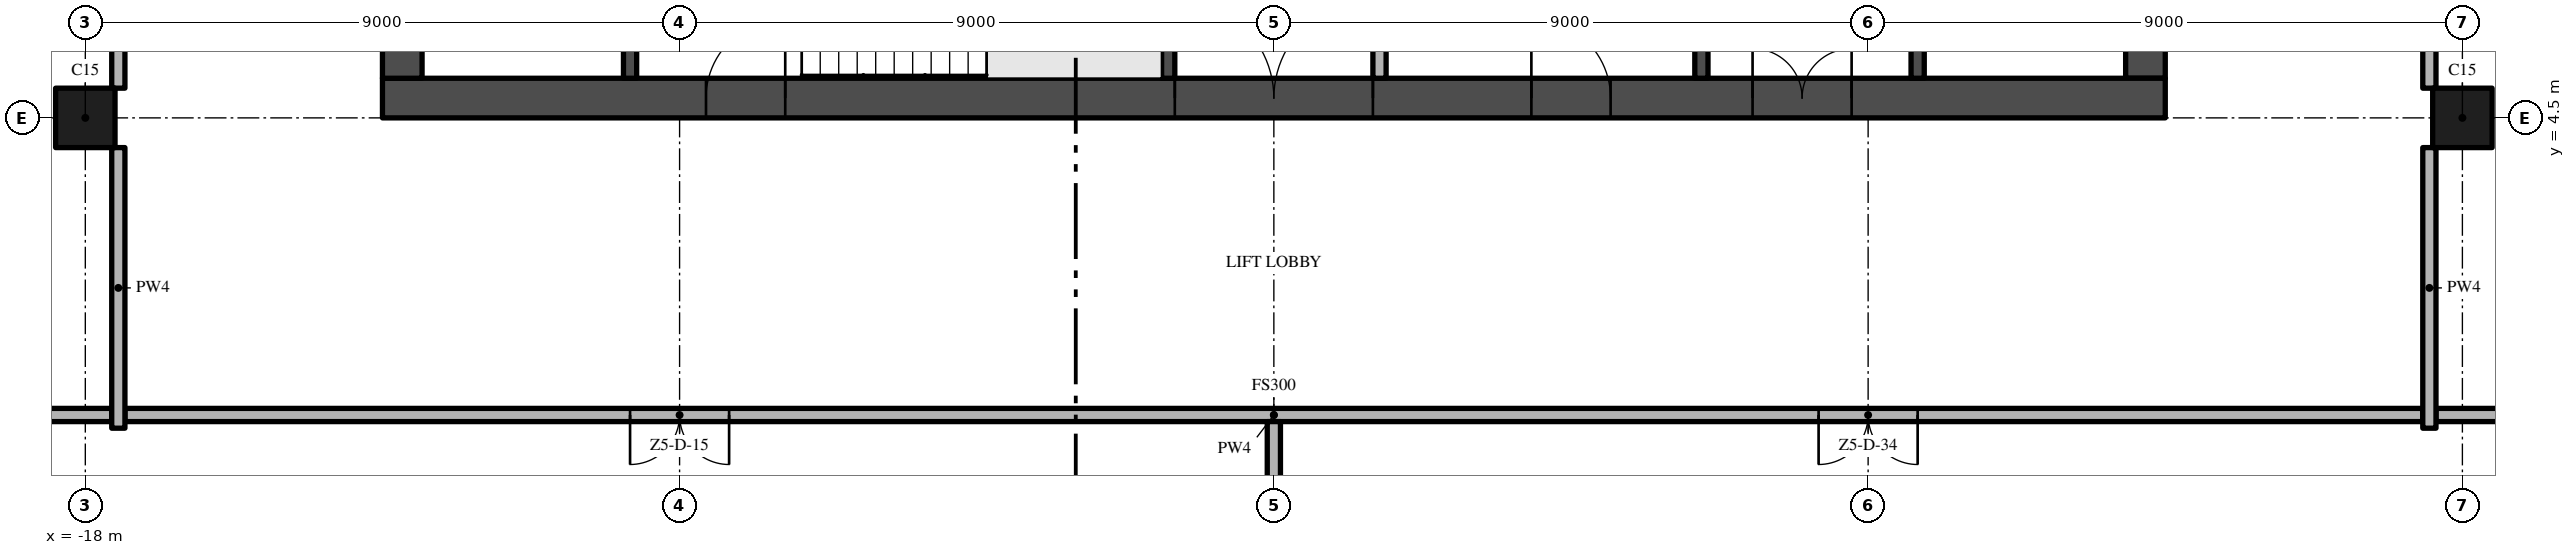
"""IFC4 building model, lengths in metres.
Left out: names, types, materials, properties, quantities, classifications, styles, units other than length and angle.
Written with IfcOpenShell. Run it as: python <this file> out.ifc"""

import sys

from ifc_helpers import new_model, si_unit, direction, frame, frame_2d, origin, origin_2d, place, context, subcontext, project, spatial, rectangle, extrude, element, fill, save


model = new_model("IFC4")
c1 = context("Model", 3, precision=1e-05, world=origin(), true_north=direction((0.0, 1.0)))
c2 = subcontext(c1, "Body", "Model", "MODEL_VIEW")
j1 = project(units=[si_unit("LENGTHUNIT", "METRE"), si_unit("PLANEANGLEUNIT", "RADIAN")], contexts=[c1])
p1 = place(None, origin())
s1 = spatial("IfcSite", under=j1, at=p1, CompositionType="ELEMENT")
p2 = place(p1, origin())
s2 = spatial("IfcBuilding", under=s1, at=p2, CompositionType="ELEMENT")
p3 = place(p2, frame((0.0, 0.0, 276.8)))
s3 = spatial("IfcBuildingStorey", under=s2, at=p3, CompositionType="ELEMENT", Elevation=276.8)
p4 = place(p3, frame((-13.5, 4.8, -0.3), z_axis=(0.0, 0.0, 1.0), x_axis=(1.0, 0.0, 0.0)))
e1 = element("IfcWall", 1, at=p4, inside=s3, PredefinedType="SHEAR", context=c2, shape_type="SweptSolid", body=[
    extrude(rectangle(XDim=27.0, YDim=0.6, at=frame_2d((13.5, 0.0))), origin(), (0.0, 0.0, 1.0), 3.8),
])
p5 = place(p4, frame((12.0, 0.0, 0.3)))
e2 = element("IfcOpeningElement", 2, at=p5, cuts=e1, PredefinedType="OPENING", context=c2, shape_type="SweptSolid", body=[
    extrude(rectangle(XDim=3.0, YDim=2.4, at=frame_2d((1.5, 1.2))), frame((0.0, 0.31, 0.0), z_axis=(0.0, -1.0, 0.0), x_axis=(1.0, 0.0, 0.0)), (0.0, 0.0, 1.0), 0.62),
])
p6 = place(p4, frame((4.9, 0.0, 0.3)))
e3 = element("IfcOpeningElement", 3, at=p6, cuts=e1, PredefinedType="OPENING", context=c2, shape_type="SweptSolid", body=[
    extrude(rectangle(XDim=1.2, YDim=2.2, at=frame_2d((0.6, 1.1))), frame((0.0, 0.31, 0.0), z_axis=(0.0, -1.0, 0.0), x_axis=(1.0, 0.0, 0.0)), (0.0, 0.0, 1.0), 0.62),
])
p7 = place(p4, frame((20.75, 0.0, 0.3)))
e4 = element("IfcOpeningElement", 4, at=p7, cuts=e1, PredefinedType="OPENING", context=c2, shape_type="SweptSolid", body=[
    extrude(rectangle(XDim=1.5, YDim=2.2, at=frame_2d((0.75, 1.1))), frame((0.0, 0.31, 0.0), z_axis=(0.0, -1.0, 0.0), x_axis=(1.0, 0.0, 0.0)), (0.0, 0.0, 1.0), 0.62),
])
p8 = place(p4, frame((17.4, 0.0, 0.3)))
e5 = element("IfcOpeningElement", 5, at=p8, cuts=e1, PredefinedType="OPENING", context=c2, shape_type="SweptSolid", body=[
    extrude(rectangle(XDim=1.2, YDim=2.2, at=frame_2d((0.6, 1.1))), frame((0.0, 0.31, 0.0), z_axis=(0.0, -1.0, 0.0), x_axis=(1.0, 0.0, 0.0)), (0.0, 0.0, 1.0), 0.62),
])
p9 = place(p3, frame((13.2, 5.1, -0.3), z_axis=(0.0, 0.0, 1.0), x_axis=(0.0, 1.0, 0.0)))
e6 = element("IfcWall", 6, at=p9, inside=s3, PredefinedType="SHEAR", context=c2, shape_type="SweptSolid", body=[
    extrude(rectangle(XDim=16.8, YDim=0.6, at=frame_2d((8.4, 0.0))), origin(), (0.0, 0.0, 1.0), 3.8),
])
p10 = place(p9, frame((6.3, 0.0, 0.3)))
e7 = element("IfcOpeningElement", 7, at=p10, cuts=e6, PredefinedType="OPENING", context=c2, shape_type="SweptSolid", body=[
    extrude(rectangle(XDim=1.2, YDim=2.2, at=frame_2d((0.6, 1.1))), frame((0.0, 0.31, 0.0), z_axis=(0.0, -1.0, 0.0), x_axis=(1.0, 0.0, 0.0)), (0.0, 0.0, 1.0), 0.62),
])
p11 = place(p3, frame((-13.2, 21.9, -0.3), z_axis=(0.0, 0.0, 1.0), x_axis=(0.0, -1.0, 0.0)))
e8 = element("IfcWall", 8, at=p11, inside=s3, PredefinedType="SHEAR", context=c2, shape_type="SweptSolid", body=[
    extrude(rectangle(XDim=16.8, YDim=0.6, at=frame_2d((8.4, 0.0))), origin(), (0.0, 0.0, 1.0), 3.8),
])
p12 = place(p11, frame((9.3, 0.0, 0.3)))
e9 = element("IfcOpeningElement", 9, at=p12, cuts=e8, PredefinedType="OPENING", context=c2, shape_type="SweptSolid", body=[
    extrude(rectangle(XDim=1.2, YDim=2.2, at=frame_2d((0.6, 1.1))), frame((0.0, 0.31, 0.0), z_axis=(0.0, -1.0, 0.0), x_axis=(1.0, 0.0, 0.0)), (0.0, 0.0, 1.0), 0.62),
])
for number, where, z_axis, x_axis in (
    (10, (-18.0, 4.5, 0.0), (0.0, 0.0, 1.0), (1.0, 0.0, 0.0)),
    (11, (18.0, 4.5, 0.0), (0.0, 0.0, 1.0), (1.0, 0.0, 0.0)),
):
    element("IfcColumn", number, at=place(p3, frame(where, z_axis=z_axis, x_axis=x_axis)), inside=s3, PredefinedType="COLUMN", context=c2, shape_type="SweptSolid", body=[
        extrude(rectangle(XDim=0.9, YDim=0.9, at=origin_2d()), origin(), (0.0, 0.0, 1.0), 3.5),
    ])
for number, where, z_axis, x_axis in (
    (12, (-9.75, 5.1, 0.0), (0.0, 0.0, 1.0), (0.0, 1.0, 0.0)),
    (13, (-1.6, 5.1, 0.0), (0.0, 0.0, 1.0), (0.0, 1.0, 0.0)),
):
    element("IfcWall", number, at=place(p3, frame(where, z_axis=z_axis, x_axis=x_axis)), inside=s3, PredefinedType="SHEAR", context=c2, shape_type="SweptSolid", body=[
        extrude(rectangle(XDim=2.85, YDim=0.2, at=frame_2d((1.425, 0.0))), origin(), (0.0, 0.0, 1.0), 3.5),
    ])
p13 = place(p3, frame((1.6, 7.5, 0.0), z_axis=(0.0, 0.0, 1.0), x_axis=(0.0, -1.0, 0.0)))
e14 = element("IfcWall", 14, at=p13, inside=s3, PredefinedType="PARTITIONING", context=c2, shape_type="SweptSolid", body=[
    extrude(rectangle(XDim=2.4, YDim=0.2, at=frame_2d((1.2, 0.0))), origin(), (0.0, 0.0, 1.0), 3.5),
])
p14 = place(p13, frame((0.35, 0.0, 0.0)))
e15 = element("IfcOpeningElement", 15, at=p14, cuts=e14, PredefinedType="OPENING", context=c2, shape_type="SweptSolid", body=[
    extrude(rectangle(XDim=0.9, YDim=2.1, at=frame_2d((0.45, 1.05))), frame((0.0, 0.11, 0.0), z_axis=(0.0, -1.0, 0.0), x_axis=(1.0, 0.0, 0.0)), (0.0, 0.0, 1.0), 0.22),
])
p15 = place(p3, frame((6.475, 5.1, 0.0), z_axis=(0.0, 0.0, 1.0), x_axis=(0.0, 1.0, 0.0)))
e16 = element("IfcWall", 16, at=p15, inside=s3, PredefinedType="SHEAR", context=c2, shape_type="SweptSolid", body=[
    extrude(rectangle(XDim=2.4, YDim=0.2, at=frame_2d((1.2, 0.0))), origin(), (0.0, 0.0, 1.0), 3.5),
])
p16 = place(p3, frame((9.75, 5.1, 0.0), z_axis=(0.0, 0.0, 1.0), x_axis=(0.0, 1.0, 0.0)))
e17 = element("IfcWall", 17, at=p16, inside=s3, PredefinedType="SHEAR", context=c2, shape_type="SweptSolid", body=[
    extrude(rectangle(XDim=2.5, YDim=0.2, at=frame_2d((1.25, 0.0))), origin(), (0.0, 0.0, 1.0), 3.5),
])
p17 = place(p16, frame((0.85, 0.0, 0.0)))
e18 = element("IfcOpeningElement", 18, at=p17, cuts=e17, PredefinedType="OPENING", context=c2, shape_type="SweptSolid", body=[
    extrude(rectangle(XDim=1.1, YDim=2.1, at=frame_2d((0.55, 1.05))), frame((0.0, 0.11, 0.0), z_axis=(0.0, -1.0, 0.0), x_axis=(1.0, 0.0, 0.0)), (0.0, 0.0, 1.0), 0.22),
])
p18 = place(p3, frame((17.4, 0.0, 0.0), z_axis=(0.0, 0.0, 1.0), x_axis=(-1.0, 0.0, 0.0)))
e19 = element("IfcWall", 19, at=p18, inside=s3, PredefinedType="PARTITIONING", context=c2, shape_type="SweptSolid", body=[
    extrude(rectangle(XDim=34.8, YDim=0.2, at=frame_2d((17.4, 0.0))), origin(), (0.0, 0.0, 1.0), 3.5),
])
p19 = place(p18, frame((25.65, 0.0, 0.0)))
e20 = element("IfcOpeningElement", 20, at=p19, cuts=e19, PredefinedType="OPENING", context=c2, shape_type="SweptSolid", body=[
    extrude(rectangle(XDim=1.5, YDim=2.4, at=frame_2d((0.75, 1.2))), frame((0.0, 0.11, 0.0), z_axis=(0.0, -1.0, 0.0), x_axis=(1.0, 0.0, 0.0)), (0.0, 0.0, 1.0), 0.22),
])
p20 = place(p18, frame((7.65, 0.0, 0.0)))
e21 = element("IfcOpeningElement", 21, at=p20, cuts=e19, PredefinedType="OPENING", context=c2, shape_type="SweptSolid", body=[
    extrude(rectangle(XDim=1.5, YDim=2.4, at=frame_2d((0.75, 1.2))), frame((0.0, 0.11, 0.0), z_axis=(0.0, -1.0, 0.0), x_axis=(1.0, 0.0, 0.0)), (0.0, 0.0, 1.0), 0.22),
])
for number, where, z_axis, x_axis in (
    (22, (-26.7, 0.0, 0.0), (0.0, 0.0, 1.0), (1.0, 0.0, 0.0)),
    (23, (17.6, 0.0, 0.0), (0.0, 0.0, 1.0), (1.0, 0.0, 0.0)),
):
    element("IfcWall", number, at=place(p3, frame(where, z_axis=z_axis, x_axis=x_axis)), inside=s3, PredefinedType="PARTITIONING", context=c2, shape_type="SweptSolid", body=[
        extrude(rectangle(XDim=9.1, YDim=0.2, at=frame_2d((4.55, 0.0))), origin(), (0.0, 0.0, 1.0), 3.5),
    ])
p21 = place(p3, frame((-17.5, -0.2, 0.0), z_axis=(0.0, 0.0, 1.0), x_axis=(0.0, 1.0, 0.0)))
e24 = element("IfcWall", 24, at=p21, inside=s3, PredefinedType="PARTITIONING", context=c2, shape_type="SweptSolid", body=[
    extrude(rectangle(XDim=4.25, YDim=0.2, at=frame_2d((2.125, 0.0))), origin(), (0.0, 0.0, 1.0), 3.5),
])
p22 = place(p3, frame((-17.5, 4.95, 0.0), z_axis=(0.0, 0.0, 1.0), x_axis=(0.0, 1.0, 0.0)))
e25 = element("IfcWall", 25, at=p22, inside=s3, PredefinedType="PARTITIONING", context=c2, shape_type="SweptSolid", body=[
    extrude(rectangle(XDim=8.1, YDim=0.2, at=frame_2d((4.05, 0.0))), origin(), (0.0, 0.0, 1.0), 3.5),
])
p23 = place(p22, frame((1.2, 0.0, 0.0)))
e26 = element("IfcOpeningElement", 26, at=p23, cuts=e25, PredefinedType="OPENING", context=c2, shape_type="SweptSolid", body=[
    extrude(rectangle(XDim=1.2, YDim=2.4, at=frame_2d((0.6, 1.2))), frame((0.0, 0.11, 0.0), z_axis=(0.0, -1.0, 0.0), x_axis=(1.0, 0.0, 0.0)), (0.0, 0.0, 1.0), 0.22),
])
p24 = place(p3, frame((0.0, -4.05, 0.0), z_axis=(0.0, 0.0, 1.0), x_axis=(0.0, 1.0, 0.0)))
e27 = element("IfcWall", 27, at=p24, inside=s3, PredefinedType="PARTITIONING", context=c2, shape_type="SweptSolid", body=[
    extrude(rectangle(XDim=3.95, YDim=0.2, at=frame_2d((1.975, 0.0))), origin(), (0.0, 0.0, 1.0), 3.5),
])
p25 = place(p3, frame((17.5, -0.2, 0.0), z_axis=(0.0, 0.0, 1.0), x_axis=(0.0, 1.0, 0.0)))
e28 = element("IfcWall", 28, at=p25, inside=s3, PredefinedType="PARTITIONING", context=c2, shape_type="SweptSolid", body=[
    extrude(rectangle(XDim=4.25, YDim=0.2, at=frame_2d((2.125, 0.0))), origin(), (0.0, 0.0, 1.0), 3.5),
])
p26 = place(p3, frame((17.5, 13.05, 0.0), z_axis=(0.0, 0.0, 1.0), x_axis=(0.0, -1.0, 0.0)))
e29 = element("IfcWall", 29, at=p26, inside=s3, PredefinedType="PARTITIONING", context=c2, shape_type="SweptSolid", body=[
    extrude(rectangle(XDim=8.1, YDim=0.2, at=frame_2d((4.05, 0.0))), origin(), (0.0, 0.0, 1.0), 3.5),
])
p27 = place(p26, frame((3.45, 0.0, 0.0)))
e30 = element("IfcOpeningElement", 30, at=p27, cuts=e29, PredefinedType="OPENING", context=c2, shape_type="SweptSolid", body=[
    extrude(rectangle(XDim=1.2, YDim=2.4, at=frame_2d((0.6, 1.2))), frame((0.0, 0.11, 0.0), z_axis=(0.0, -1.0, 0.0), x_axis=(1.0, 0.0, 0.0)), (0.0, 0.0, 1.0), 0.22),
])
p28 = place(p5, frame((3.0, 0.0, 0.0), z_axis=(0.0, 0.0, 1.0), x_axis=(-1.0, 0.0, 0.0)))
e31 = element("IfcDoor", 31, at=p28, inside=s3, OperationType="DOUBLE_DOOR_SINGLE_SWING", PredefinedType="DOOR", context=c2, shape_type="SweptSolid", body=[
    extrude(rectangle(XDim=3.0, YDim=2.4, at=frame_2d((1.5, 1.2))), frame((0.0, 0.025, 0.0), z_axis=(0.0, -1.0, 0.0), x_axis=(1.0, 0.0, 0.0)), (0.0, 0.0, 1.0), 0.05),
])
fill(e2, e31)
p29 = place(p6, frame((1.2, 0.0, 0.0), z_axis=(0.0, 0.0, 1.0), x_axis=(-1.0, 0.0, 0.0)))
e32 = element("IfcDoor", 32, at=p29, inside=s3, OperationType="SINGLE_SWING_LEFT", PredefinedType="DOOR", context=c2, shape_type="SweptSolid", body=[
    extrude(rectangle(XDim=1.2, YDim=2.2, at=frame_2d((0.6, 1.1))), frame((0.0, 0.025, 0.0), z_axis=(0.0, -1.0, 0.0), x_axis=(1.0, 0.0, 0.0)), (0.0, 0.0, 1.0), 0.05),
])
fill(e3, e32)
p30 = place(p7, frame((1.5, 0.0, 0.0), z_axis=(0.0, 0.0, 1.0), x_axis=(-1.0, 0.0, 0.0)))
e33 = element("IfcDoor", 33, at=p30, inside=s3, OperationType="DOUBLE_DOOR_SINGLE_SWING", PredefinedType="DOOR", context=c2, shape_type="SweptSolid", body=[
    extrude(rectangle(XDim=1.5, YDim=2.2, at=frame_2d((0.75, 1.1))), frame((0.0, 0.025, 0.0), z_axis=(0.0, -1.0, 0.0), x_axis=(1.0, 0.0, 0.0)), (0.0, 0.0, 1.0), 0.05),
])
fill(e4, e33)
p31 = place(p8, frame((1.2, 0.0, 0.0), z_axis=(0.0, 0.0, 1.0), x_axis=(-1.0, 0.0, 0.0)))
e34 = element("IfcDoor", 34, at=p31, inside=s3, OperationType="SINGLE_SWING_RIGHT", PredefinedType="DOOR", context=c2, shape_type="SweptSolid", body=[
    extrude(rectangle(XDim=1.2, YDim=2.2, at=frame_2d((0.6, 1.1))), frame((0.0, 0.025, 0.0), z_axis=(0.0, -1.0, 0.0), x_axis=(1.0, 0.0, 0.0)), (0.0, 0.0, 1.0), 0.05),
])
fill(e5, e34)
p32 = place(p19, origin())
e35 = element("IfcDoor", 35, at=p32, inside=s3, OperationType="DOUBLE_DOOR_SINGLE_SWING", PredefinedType="DOOR", context=c2, shape_type="SweptSolid", body=[
    extrude(rectangle(XDim=1.5, YDim=2.4, at=frame_2d((0.75, 1.2))), frame((0.0, 0.025, 0.0), z_axis=(0.0, -1.0, 0.0), x_axis=(1.0, 0.0, 0.0)), (0.0, 0.0, 1.0), 0.05),
])
fill(e20, e35)
p33 = place(p20, origin())
e36 = element("IfcDoor", 36, at=p33, inside=s3, OperationType="DOUBLE_DOOR_SINGLE_SWING", PredefinedType="DOOR", context=c2, shape_type="SweptSolid", body=[
    extrude(rectangle(XDim=1.5, YDim=2.4, at=frame_2d((0.75, 1.2))), frame((0.0, 0.025, 0.0), z_axis=(0.0, -1.0, 0.0), x_axis=(1.0, 0.0, 0.0)), (0.0, 0.0, 1.0), 0.05),
])
fill(e21, e36)
save(model, sys.argv[1])
